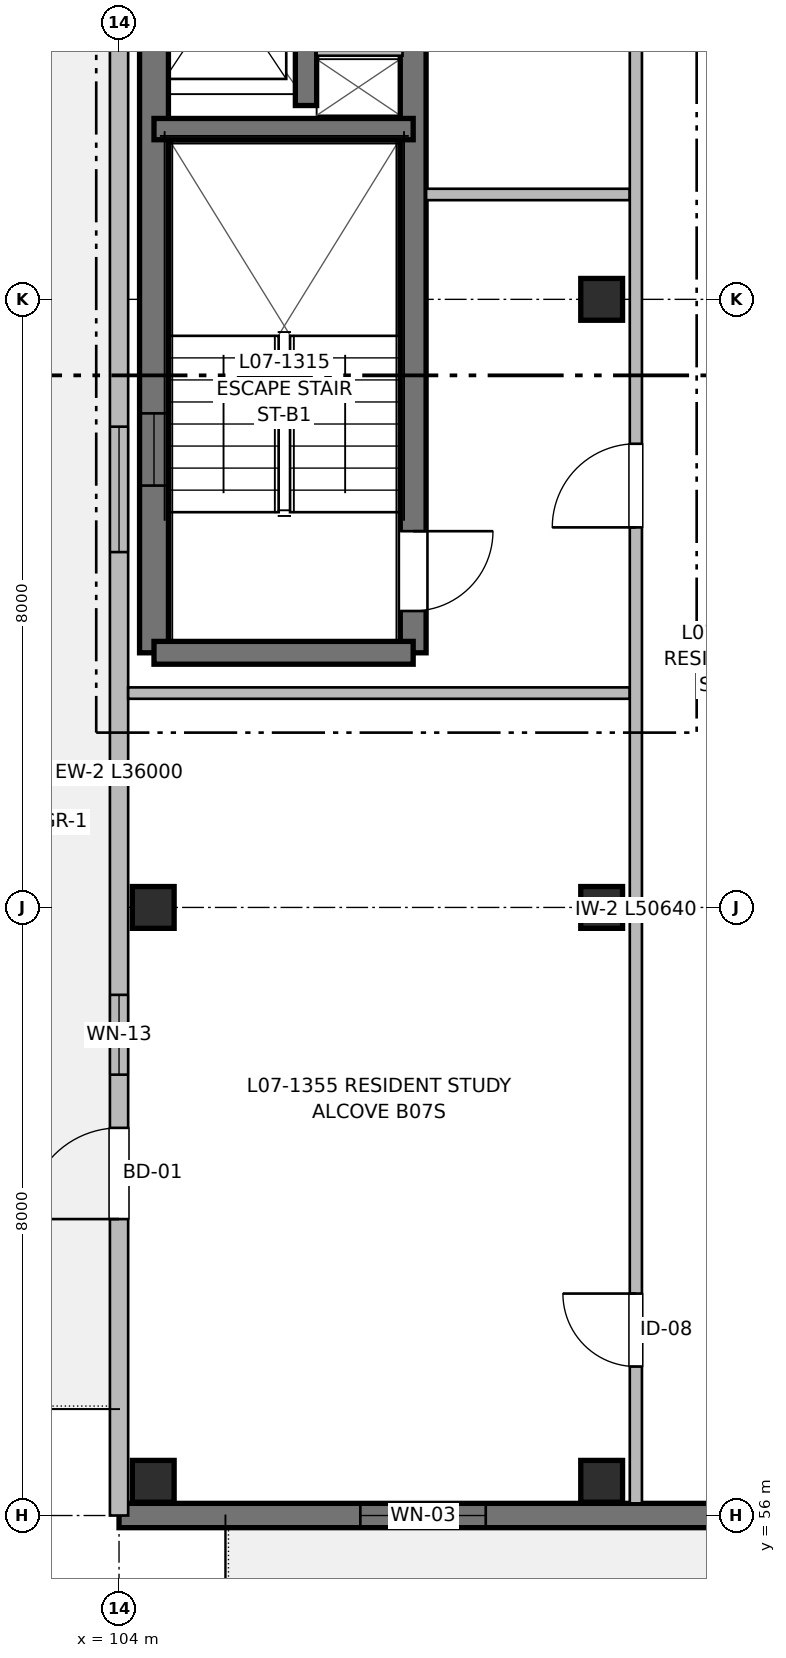
"""IFC4 building model, lengths in metres.
Left out: names, types, materials, properties, quantities, classifications, styles, units other than length and angle.
Written with IfcOpenShell. Run it as: python <this file> out.ifc"""

import sys

from ifc_helpers import new_model, si_unit, direction, frame, frame_2d, origin, origin_2d, place, context, subcontext, project, spatial, rectangle, extrude, element, fill, save


model = new_model("IFC4")
c1 = context("Model", 3, precision=1e-05, world=origin(), true_north=direction((0.0, 1.0)))
c2 = subcontext(c1, "Body", "Model", "MODEL_VIEW")
j1 = project(units=[si_unit("LENGTHUNIT", "METRE"), si_unit("PLANEANGLEUNIT", "RADIAN")], contexts=[c1])
p1 = place(None, origin())
s1 = spatial("IfcSite", under=j1, at=p1, CompositionType="ELEMENT")
p2 = place(p1, origin())
s2 = spatial("IfcBuilding", under=s1, at=p2, CompositionType="ELEMENT")
p3 = place(p2, frame((0.0, 0.0, 23.36)))
s3 = spatial("IfcBuildingStorey", under=s2, at=p3, CompositionType="ELEMENT", Elevation=23.36)
for number, where, z_axis, x_axis in (
    (1, (104.45, 56.45, 0.0), (0.0, 0.0, 1.0), (1.0, 0.0, 0.0)),
    (2, (104.45, 64.0, 0.0), (0.0, 0.0, 1.0), (1.0, 0.0, 0.0)),
    (3, (110.35, 56.45, 0.0), (0.0, 0.0, 1.0), (1.0, 0.0, 0.0)),
    (4, (110.35, 64.0, 0.0), (0.0, 0.0, 1.0), (1.0, 0.0, 0.0)),
    (5, (110.35, 72.0, 0.0), (0.0, 0.0, 1.0), (1.0, 0.0, 0.0)),
):
    element("IfcColumn", number, at=place(p3, frame(where, z_axis=z_axis, x_axis=x_axis)), inside=s3, PredefinedType="COLUMN", context=c2, shape_type="SweptSolid", body=[
        extrude(rectangle(XDim=0.55, YDim=0.55, at=origin_2d()), origin(), (0.0, 0.0, 1.0), 3.2),
    ])
p4 = place(p3, frame((104.46, 67.35, 0.0), z_axis=(0.0, 0.0, 1.0), x_axis=(0.0, 1.0, 0.0)))
e6 = element("IfcWall", 6, at=p4, inside=s3, PredefinedType="SHEAR", context=c2, shape_type="SweptSolid", body=[
    extrude(rectangle(XDim=12.45, YDim=0.38, at=frame_2d((6.225, 0.0))), origin(), (0.0, 0.0, 1.0), 3.2),
])
p5 = place(p4, frame((2.2, 0.0, 0.97)))
e7 = element("IfcOpeningElement", 7, at=p5, cuts=e6, PredefinedType="OPENING", context=c2, shape_type="SweptSolid", body=[
    extrude(rectangle(XDim=0.95, YDim=1.25, at=frame_2d((0.475, 0.625))), frame((0.0, 0.2, 0.0), z_axis=(0.0, -1.0, 0.0), x_axis=(1.0, 0.0, 0.0)), (0.0, 0.0, 1.0), 0.4),
])
p6 = place(p3, frame((107.87, 79.8, 0.0), z_axis=(0.0, 0.0, 1.0), x_axis=(0.0, -1.0, 0.0)))
e8 = element("IfcWall", 8, at=p6, inside=s3, PredefinedType="SHEAR", context=c2, shape_type="SweptSolid", body=[
    extrude(rectangle(XDim=12.45, YDim=0.34, at=frame_2d((6.225, 0.0))), origin(), (0.0, 0.0, 1.0), 3.2),
])
p7 = place(p6, frame((10.85, 0.0, 0.0)))
e9 = element("IfcOpeningElement", 9, at=p7, cuts=e8, PredefinedType="OPENING", context=c2, shape_type="SweptSolid", body=[
    extrude(rectangle(XDim=1.05, YDim=2.15, at=frame_2d((0.525, 1.075))), frame((0.0, 0.18, 0.0), z_axis=(0.0, -1.0, 0.0), x_axis=(1.0, 0.0, 0.0)), (0.0, 0.0, 1.0), 0.36),
])
p8 = place(p3, frame((107.87, 67.35, 0.0), z_axis=(0.0, 0.0, 1.0), x_axis=(-1.0, 0.0, 0.0)))
e10 = element("IfcWall", 10, at=p8, inside=s3, PredefinedType="SHEAR", context=c2, shape_type="SweptSolid", body=[
    extrude(rectangle(XDim=3.41, YDim=0.3, at=frame_2d((1.705, 0.0))), origin(), (0.0, 0.0, 1.0), 3.2),
])
p9 = place(p3, frame((104.46, 74.24, 0.0), z_axis=(0.0, 0.0, 1.0), x_axis=(1.0, 0.0, 0.0)))
e11 = element("IfcWall", 11, at=p9, inside=s3, PredefinedType="SHEAR", context=c2, shape_type="SweptSolid", body=[
    extrude(rectangle(XDim=3.41, YDim=0.28, at=frame_2d((1.705, 0.0))), origin(), (0.0, 0.0, 1.0), 3.2),
])
p10 = place(p3, frame((106.46, 74.55, 0.0), z_axis=(0.0, 0.0, 1.0), x_axis=(0.0, 1.0, 0.0)))
e12 = element("IfcWall", 12, at=p10, inside=s3, PredefinedType="SHEAR", context=c2, shape_type="SweptSolid", body=[
    extrude(rectangle(XDim=5.25, YDim=0.28, at=frame_2d((2.625, 0.0))), origin(), (0.0, 0.0, 1.0), 3.2),
])
p11 = place(p10, frame((1.15, 0.0, 0.0)))
e13 = element("IfcOpeningElement", 13, at=p11, cuts=e12, PredefinedType="OPENING", context=c2, shape_type="SweptSolid", body=[
    extrude(rectangle(XDim=1.0, YDim=2.15, at=frame_2d((0.5, 1.075))), frame((0.0, 0.15, 0.0), z_axis=(0.0, -1.0, 0.0), x_axis=(1.0, 0.0, 0.0)), (0.0, 0.0, 1.0), 0.3),
])
p12 = place(p10, frame((3.85, 0.0, 0.0)))
e14 = element("IfcOpeningElement", 14, at=p12, cuts=e12, PredefinedType="OPENING", context=c2, shape_type="SweptSolid", body=[
    extrude(rectangle(XDim=0.9, YDim=2.15, at=frame_2d((0.45, 1.075))), frame((0.0, 0.15, 0.0), z_axis=(0.0, -1.0, 0.0), x_axis=(1.0, 0.0, 0.0)), (0.0, 0.0, 1.0), 0.3),
])
p13 = place(p3, frame((106.6, 75.28, 0.0), z_axis=(0.0, 0.0, 1.0), x_axis=(1.0, 0.0, 0.0)))
e15 = element("IfcWall", 15, at=p13, inside=s3, PredefinedType="PARTITIONING", context=c2, shape_type="SweptSolid", body=[
    extrude(rectangle(XDim=1.13, YDim=0.15, at=frame_2d((0.565, 0.0))), origin(), (0.0, 0.0, 1.0), 2.95),
])
p14 = place(p3, frame((120.0, 56.0, 0.0), z_axis=(0.0, 0.0, 1.0), x_axis=(-1.0, 0.0, 0.0)))
e16 = element("IfcWall", 16, at=p14, inside=s3, PredefinedType="SHEAR", context=c2, shape_type="SweptSolid", body=[
    extrude(rectangle(XDim=16.0, YDim=0.32, at=frame_2d((8.0, 0.0))), origin(), (0.0, 0.0, 1.0), 2.98),
])
p15 = place(p14, frame((3.4, 0.0, 0.0)))
e17 = element("IfcOpeningElement", 17, at=p15, cuts=e16, PredefinedType="OPENING", context=c2, shape_type="SweptSolid", body=[
    extrude(rectangle(XDim=1.2, YDim=2.2, at=frame_2d((0.6, 1.1))), frame((0.0, 0.17, 0.0), z_axis=(0.0, -1.0, 0.0), x_axis=(1.0, 0.0, 0.0)), (0.0, 0.0, 1.0), 0.34),
])
p16 = place(p14, frame((5.3, 0.0, 0.9)))
e18 = element("IfcOpeningElement", 18, at=p16, cuts=e16, PredefinedType="OPENING", context=c2, shape_type="SweptSolid", body=[
    extrude(rectangle(XDim=1.05, YDim=1.15, at=frame_2d((0.525, 0.575))), frame((0.0, 0.17, 0.0), z_axis=(0.0, -1.0, 0.0), x_axis=(1.0, 0.0, 0.0)), (0.0, 0.0, 1.0), 0.34),
])
p17 = place(p14, frame((11.175, 0.0, 0.77)))
e19 = element("IfcOpeningElement", 19, at=p17, cuts=e16, PredefinedType="OPENING", context=c2, shape_type="SweptSolid", body=[
    extrude(rectangle(XDim=1.65, YDim=1.45, at=frame_2d((0.825, 0.725))), frame((0.0, 0.17, 0.0), z_axis=(0.0, -1.0, 0.0), x_axis=(1.0, 0.0, 0.0)), (0.0, 0.0, 1.0), 0.34),
])
p18 = place(p3, frame((104.0, 56.0, 0.0), z_axis=(0.0, 0.0, 1.0), x_axis=(0.0, 1.0, 0.0)))
e20 = element("IfcWall", 20, at=p18, inside=s3, PredefinedType="SOLIDWALL", context=c2, shape_type="SweptSolid", body=[
    extrude(rectangle(XDim=36.0, YDim=0.24, at=frame_2d((18.0, 0.0))), origin(), (0.0, 0.0, 1.0), 2.98),
])
p19 = place(p18, frame((3.9, 0.0, 0.0)))
e21 = element("IfcOpeningElement", 21, at=p19, cuts=e20, PredefinedType="OPENING", context=c2, shape_type="SweptSolid", body=[
    extrude(rectangle(XDim=1.2, YDim=2.2, at=frame_2d((0.6, 1.1))), frame((0.0, 0.13, 0.0), z_axis=(0.0, -1.0, 0.0), x_axis=(1.0, 0.0, 0.0)), (0.0, 0.0, 1.0), 0.26),
])
p20 = place(p18, frame((5.8, 0.0, 0.9)))
e22 = element("IfcOpeningElement", 22, at=p20, cuts=e20, PredefinedType="OPENING", context=c2, shape_type="SweptSolid", body=[
    extrude(rectangle(XDim=1.05, YDim=1.15, at=frame_2d((0.525, 0.575))), frame((0.0, 0.13, 0.0), z_axis=(0.0, -1.0, 0.0), x_axis=(1.0, 0.0, 0.0)), (0.0, 0.0, 1.0), 0.26),
])
p21 = place(p18, frame((12.675, 0.0, 0.77)))
e23 = element("IfcOpeningElement", 23, at=p21, cuts=e20, PredefinedType="OPENING", context=c2, shape_type="SweptSolid", body=[
    extrude(rectangle(XDim=1.65, YDim=1.45, at=frame_2d((0.825, 0.725))), frame((0.0, 0.13, 0.0), z_axis=(0.0, -1.0, 0.0), x_axis=(1.0, 0.0, 0.0)), (0.0, 0.0, 1.0), 0.26),
])
p22 = place(p18, frame((19.9, 0.0, 0.77)))
e24 = element("IfcOpeningElement", 24, at=p22, cuts=e20, PredefinedType="OPENING", context=c2, shape_type="SweptSolid", body=[
    extrude(rectangle(XDim=1.6, YDim=1.45, at=frame_2d((0.8, 0.725))), frame((0.0, 0.13, 0.0), z_axis=(0.0, -1.0, 0.0), x_axis=(1.0, 0.0, 0.0)), (0.0, 0.0, 1.0), 0.26),
])
p23 = place(p18, frame((30.3, 0.0, 0.72)))
e25 = element("IfcOpeningElement", 25, at=p23, cuts=e20, PredefinedType="OPENING", context=c2, shape_type="SweptSolid", body=[
    extrude(rectangle(XDim=2.4, YDim=1.5, at=frame_2d((1.2, 0.75))), frame((0.0, 0.13, 0.0), z_axis=(0.0, -1.0, 0.0), x_axis=(1.0, 0.0, 0.0)), (0.0, 0.0, 1.0), 0.26),
])
p24 = place(p3, frame((104.12, 66.82, 0.0), z_axis=(0.0, 0.0, 1.0), x_axis=(1.0, 0.0, 0.0)))
e26 = element("IfcWall", 26, at=p24, inside=s3, PredefinedType="PARTITIONING", context=c2, shape_type="SweptSolid", body=[
    extrude(rectangle(XDim=6.6, YDim=0.15, at=frame_2d((3.3, 0.0))), origin(), (0.0, 0.0, 1.0), 2.935),
])
p25 = place(p3, frame((108.04, 73.38, 0.0), z_axis=(0.0, 0.0, 1.0), x_axis=(1.0, 0.0, 0.0)))
e27 = element("IfcWall", 27, at=p25, inside=s3, PredefinedType="PARTITIONING", context=c2, shape_type="SweptSolid", body=[
    extrude(rectangle(XDim=2.68, YDim=0.15, at=frame_2d((1.34, 0.0))), origin(), (0.0, 0.0, 1.0), 2.935),
])
p26 = place(p3, frame((110.8, 56.16, 0.0), z_axis=(0.0, 0.0, 1.0), x_axis=(0.0, 1.0, 0.0)))
e28 = element("IfcWall", 28, at=p26, inside=s3, PredefinedType="PARTITIONING", context=c2, shape_type="SweptSolid", body=[
    extrude(rectangle(XDim=50.64, YDim=0.16, at=frame_2d((25.32, 0.0))), origin(), (0.0, 0.0, 1.0), 2.935),
])
p27 = place(p26, frame((12.84, 0.0, 0.0)))
e29 = element("IfcOpeningElement", 29, at=p27, cuts=e28, PredefinedType="OPENING", context=c2, shape_type="SweptSolid", body=[
    extrude(rectangle(XDim=1.1, YDim=2.15, at=frame_2d((0.55, 1.075))), frame((0.0, 0.09, 0.0), z_axis=(0.0, -1.0, 0.0), x_axis=(1.0, 0.0, 0.0)), (0.0, 0.0, 1.0), 0.18),
])
p28 = place(p26, frame((19.24, 0.0, 0.0)))
e30 = element("IfcOpeningElement", 30, at=p28, cuts=e28, PredefinedType="OPENING", context=c2, shape_type="SweptSolid", body=[
    extrude(rectangle(XDim=1.6, YDim=2.15, at=frame_2d((0.8, 1.075))), frame((0.0, 0.09, 0.0), z_axis=(0.0, -1.0, 0.0), x_axis=(1.0, 0.0, 0.0)), (0.0, 0.0, 1.0), 0.18),
])
p29 = place(p26, frame((1.8, 0.0, 0.0)))
e31 = element("IfcOpeningElement", 31, at=p29, cuts=e28, PredefinedType="OPENING", context=c2, shape_type="SweptSolid", body=[
    extrude(rectangle(XDim=0.96, YDim=2.15, at=frame_2d((0.48, 1.075))), frame((0.0, 0.09, 0.0), z_axis=(0.0, -1.0, 0.0), x_axis=(1.0, 0.0, 0.0)), (0.0, 0.0, 1.0), 0.18),
])
p30 = place(p26, frame((32.745, 0.0, 0.0)))
e32 = element("IfcOpeningElement", 32, at=p30, cuts=e28, PredefinedType="OPENING", context=c2, shape_type="SweptSolid", body=[
    extrude(rectangle(XDim=0.98, YDim=2.15, at=frame_2d((0.49, 1.075))), frame((0.0, 0.09, 0.0), z_axis=(0.0, -1.0, 0.0), x_axis=(1.0, 0.0, 0.0)), (0.0, 0.0, 1.0), 0.18),
])
p31 = place(p26, frame((40.955, 0.0, 0.0)))
e33 = element("IfcOpeningElement", 33, at=p31, cuts=e28, PredefinedType="OPENING", context=c2, shape_type="SweptSolid", body=[
    extrude(rectangle(XDim=0.98, YDim=2.15, at=frame_2d((0.49, 1.075))), frame((0.0, 0.09, 0.0), z_axis=(0.0, -1.0, 0.0), x_axis=(1.0, 0.0, 0.0)), (0.0, 0.0, 1.0), 0.18),
])
p32 = place(p7, origin())
e34 = element("IfcDoor", 34, at=p32, inside=s3, OperationType="SINGLE_SWING_LEFT", PredefinedType="DOOR", context=c2, shape_type="SweptSolid", body=[
    extrude(rectangle(XDim=1.05, YDim=2.15, at=frame_2d((0.525, 1.075))), frame((0.0, 0.025, 0.0), z_axis=(0.0, -1.0, 0.0), x_axis=(1.0, 0.0, 0.0)), (0.0, 0.0, 1.0), 0.05),
])
fill(e9, e34)
p33 = place(p5, origin())
e35 = element("IfcWindow", 35, at=p33, inside=s3, PartitioningType="SINGLE_PANEL", PredefinedType="WINDOW", context=c2, shape_type="SweptSolid", body=[
    extrude(rectangle(XDim=0.95, YDim=1.25, at=frame_2d((0.475, 0.625))), frame((0.0, 0.03, 0.0), z_axis=(0.0, -1.0, 0.0), x_axis=(1.0, 0.0, 0.0)), (0.0, 0.0, 1.0), 0.06),
])
fill(e7, e35)
p34 = place(p17, origin())
e36 = element("IfcWindow", 36, at=p34, inside=s3, PartitioningType="SINGLE_PANEL", PredefinedType="WINDOW", context=c2, shape_type="SweptSolid", body=[
    extrude(rectangle(XDim=1.65, YDim=1.45, at=frame_2d((0.825, 0.725))), frame((0.0, 0.03, 0.0), z_axis=(0.0, -1.0, 0.0), x_axis=(1.0, 0.0, 0.0)), (0.0, 0.0, 1.0), 0.06),
])
fill(e19, e36)
p35 = place(p19, origin())
e37 = element("IfcDoor", 37, at=p35, inside=s3, OperationType="SINGLE_SWING_LEFT", PredefinedType="DOOR", context=c2, shape_type="SweptSolid", body=[
    extrude(rectangle(XDim=1.2, YDim=2.2, at=frame_2d((0.6, 1.1))), frame((0.0, 0.025, 0.0), z_axis=(0.0, -1.0, 0.0), x_axis=(1.0, 0.0, 0.0)), (0.0, 0.0, 1.0), 0.05),
])
fill(e21, e37)
p36 = place(p20, origin())
e38 = element("IfcWindow", 38, at=p36, inside=s3, PartitioningType="SINGLE_PANEL", PredefinedType="WINDOW", context=c2, shape_type="SweptSolid", body=[
    extrude(rectangle(XDim=1.05, YDim=1.15, at=frame_2d((0.525, 0.575))), frame((0.0, 0.03, 0.0), z_axis=(0.0, -1.0, 0.0), x_axis=(1.0, 0.0, 0.0)), (0.0, 0.0, 1.0), 0.06),
])
fill(e22, e38)
p37 = place(p21, origin())
e39 = element("IfcWindow", 39, at=p37, inside=s3, PartitioningType="SINGLE_PANEL", PredefinedType="WINDOW", context=c2, shape_type="SweptSolid", body=[
    extrude(rectangle(XDim=1.65, YDim=1.45, at=frame_2d((0.825, 0.725))), frame((0.0, 0.03, 0.0), z_axis=(0.0, -1.0, 0.0), x_axis=(1.0, 0.0, 0.0)), (0.0, 0.0, 1.0), 0.06),
])
fill(e23, e39)
p38 = place(p27, origin())
e40 = element("IfcDoor", 40, at=p38, inside=s3, OperationType="SINGLE_SWING_LEFT", PredefinedType="DOOR", context=c2, shape_type="SweptSolid", body=[
    extrude(rectangle(XDim=1.1, YDim=2.15, at=frame_2d((0.55, 1.075))), frame((0.0, 0.025, 0.0), z_axis=(0.0, -1.0, 0.0), x_axis=(1.0, 0.0, 0.0)), (0.0, 0.0, 1.0), 0.05),
])
fill(e29, e40)
p39 = place(p29, origin())
e41 = element("IfcDoor", 41, at=p39, inside=s3, OperationType="SINGLE_SWING_RIGHT", PredefinedType="DOOR", context=c2, shape_type="SweptSolid", body=[
    extrude(rectangle(XDim=0.96, YDim=2.15, at=frame_2d((0.48, 1.075))), frame((0.0, 0.025, 0.0), z_axis=(0.0, -1.0, 0.0), x_axis=(1.0, 0.0, 0.0)), (0.0, 0.0, 1.0), 0.05),
])
fill(e31, e41)
save(model, sys.argv[1])
